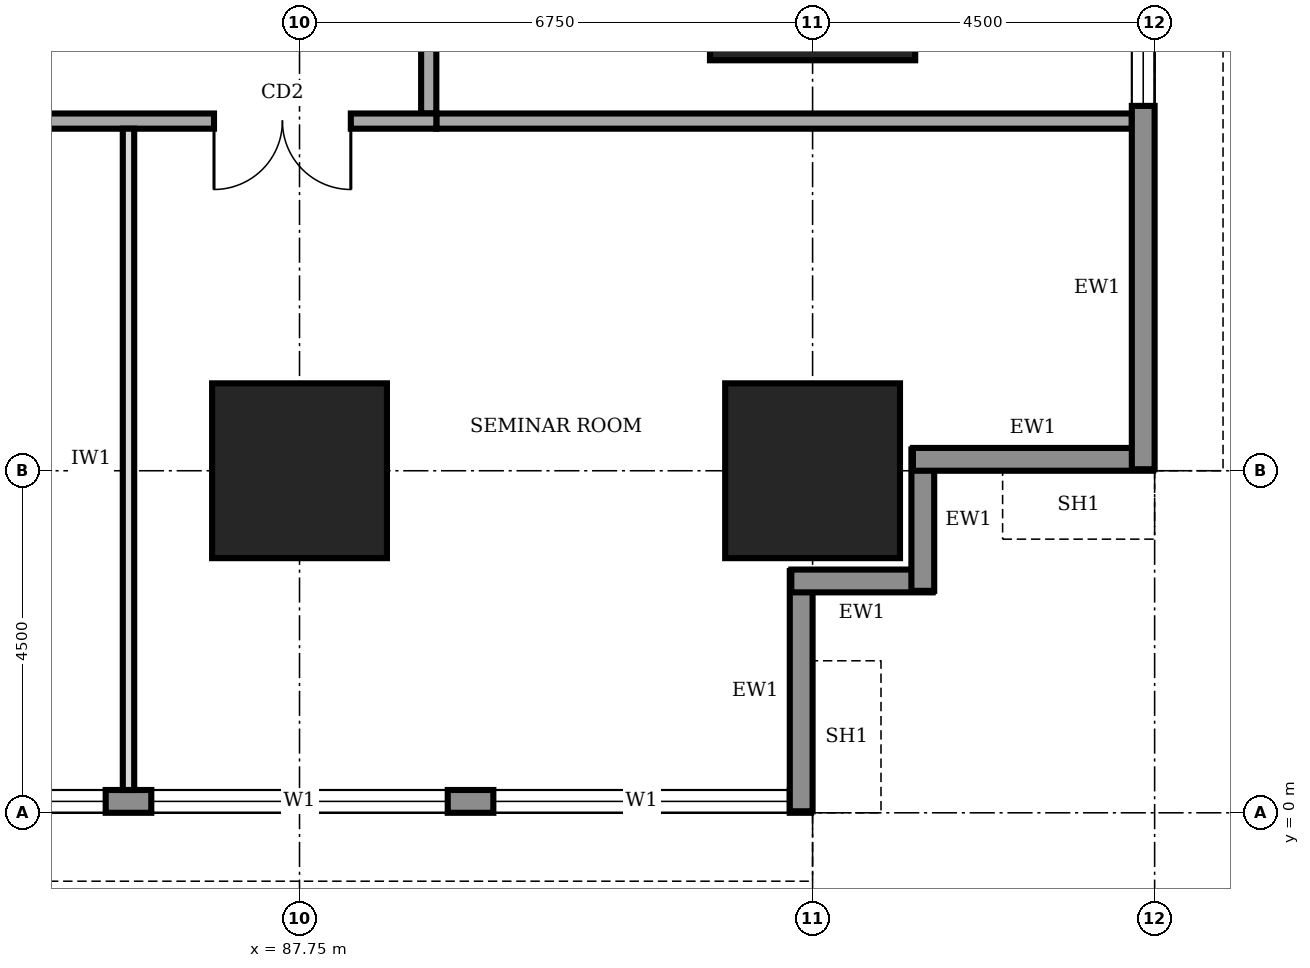
"""IFC4 building model, lengths in metres.
Left out: names, types, materials, properties, quantities, classifications, styles, units other than length and angle.
Written with IfcOpenShell. Run it as: python <this file> out.ifc"""

import sys

from ifc_helpers import new_model, si_unit, direction, frame, frame_2d, origin, origin_2d, place, context, subcontext, project, spatial, rectangle, extrude, element, fill, save


model = new_model("IFC4")
c1 = context("Model", 3, precision=1e-05, world=origin(), true_north=direction((0.0, 1.0)))
c2 = subcontext(c1, "Body", "Model", "MODEL_VIEW")
j1 = project(units=[si_unit("LENGTHUNIT", "METRE"), si_unit("PLANEANGLEUNIT", "RADIAN")], contexts=[c1])
p1 = place(None, origin())
s1 = spatial("IfcSite", under=j1, at=p1, CompositionType="ELEMENT")
p2 = place(p1, origin())
s2 = spatial("IfcBuilding", under=s1, at=p2, CompositionType="ELEMENT")
p3 = place(p2, frame((0.0, 0.0, 25.0)))
s3 = spatial("IfcBuildingStorey", under=s2, at=p3, CompositionType="ELEMENT", Elevation=25.0)
for number, where, z_axis, x_axis in (
    (1, (87.75, 4.5, 0.0), (0.0, 0.0, 1.0), (1.0, 0.0, 0.0)),
    (2, (94.5, 4.5, 0.0), (0.0, 0.0, 1.0), (1.0, 0.0, 0.0)),
):
    element("IfcColumn", number, at=place(p3, frame(where, z_axis=z_axis, x_axis=x_axis)), inside=s3, PredefinedType="COLUMN", context=c2, shape_type="SweptSolid", body=[
        extrude(rectangle(XDim=2.3, YDim=2.3, at=origin_2d()), origin(), (0.0, 0.0, 1.0), 4.0),
    ])
p4 = place(p3, frame((94.5, 11.25, 0.0), z_axis=(0.0, 0.0, 1.0), x_axis=(1.0, 0.0, 0.0)))
e3 = element("IfcColumn", 3, at=p4, inside=s3, PredefinedType="COLUMN", context=c2, shape_type="SweptSolid", body=[
    extrude(rectangle(XDim=2.7, YDim=2.7, at=origin_2d()), origin(), (0.0, 0.0, 1.0), 4.0),
])
p5 = place(p3, frame((67.52, 0.15, 0.0), z_axis=(0.0, 0.0, 1.0), x_axis=(1.0, 0.0, 0.0)))
e4 = element("IfcWall", 4, at=p5, inside=s3, PredefinedType="STANDARD", context=c2, shape_type="SweptSolid", body=[
    extrude(rectangle(XDim=26.96, YDim=0.3, at=frame_2d((13.48, 0.0))), origin(), (0.0, 0.0, 1.0), 3.75),
])
p6 = place(p5, frame((4.78, 0.0, 0.9)))
e5 = element("IfcOpeningElement", 5, at=p6, cuts=e4, PredefinedType="OPENING", context=c2, shape_type="SweptSolid", body=[
    extrude(rectangle(XDim=3.9, YDim=2.2, at=frame_2d((1.95, 1.1))), frame((0.0, 0.16, 0.0), z_axis=(0.0, -1.0, 0.0), x_axis=(1.0, 0.0, 0.0)), (0.0, 0.0, 1.0), 0.32),
])
p7 = place(p5, frame((9.28, 0.0, 0.9)))
e6 = element("IfcOpeningElement", 6, at=p7, cuts=e4, PredefinedType="OPENING", context=c2, shape_type="SweptSolid", body=[
    extrude(rectangle(XDim=3.9, YDim=2.2, at=frame_2d((1.95, 1.1))), frame((0.0, 0.16, 0.0), z_axis=(0.0, -1.0, 0.0), x_axis=(1.0, 0.0, 0.0)), (0.0, 0.0, 1.0), 0.32),
])
p8 = place(p5, frame((13.78, 0.0, 0.9)))
e7 = element("IfcOpeningElement", 7, at=p8, cuts=e4, PredefinedType="OPENING", context=c2, shape_type="SweptSolid", body=[
    extrude(rectangle(XDim=3.9, YDim=2.2, at=frame_2d((1.95, 1.1))), frame((0.0, 0.16, 0.0), z_axis=(0.0, -1.0, 0.0), x_axis=(1.0, 0.0, 0.0)), (0.0, 0.0, 1.0), 0.32),
])
p9 = place(p5, frame((18.28, 0.0, 0.9)))
e8 = element("IfcOpeningElement", 8, at=p9, cuts=e4, PredefinedType="OPENING", context=c2, shape_type="SweptSolid", body=[
    extrude(rectangle(XDim=3.9, YDim=2.2, at=frame_2d((1.95, 1.1))), frame((0.0, 0.16, 0.0), z_axis=(0.0, -1.0, 0.0), x_axis=(1.0, 0.0, 0.0)), (0.0, 0.0, 1.0), 0.32),
])
p10 = place(p5, frame((22.78, 0.0, 0.9)))
e9 = element("IfcOpeningElement", 9, at=p10, cuts=e4, PredefinedType="OPENING", context=c2, shape_type="SweptSolid", body=[
    extrude(rectangle(XDim=3.9, YDim=2.2, at=frame_2d((1.95, 1.1))), frame((0.0, 0.16, 0.0), z_axis=(0.0, -1.0, 0.0), x_axis=(1.0, 0.0, 0.0)), (0.0, 0.0, 1.0), 0.32),
])
p11 = place(p3, frame((94.35, 0.02, 0.0), z_axis=(0.0, 0.0, 1.0), x_axis=(0.0, 1.0, 0.0)))
e10 = element("IfcWall", 10, at=p11, inside=s3, PredefinedType="STANDARD", context=c2, shape_type="SweptSolid", body=[
    extrude(rectangle(XDim=3.16, YDim=0.3, at=frame_2d((1.58, 0.0))), origin(), (0.0, 0.0, 1.0), 2.85),
])
for number, where, z_axis, x_axis in (
    (11, (94.22, 3.05, 0.0), (0.0, 0.0, 1.0), (1.0, 0.0, 0.0)),
    (12, (95.95, 2.92, 0.0), (0.0, 0.0, 1.0), (0.0, 1.0, 0.0)),
):
    element("IfcWall", number, at=place(p3, frame(where, z_axis=z_axis, x_axis=x_axis)), inside=s3, PredefinedType="STANDARD", context=c2, shape_type="SweptSolid", body=[
        extrude(rectangle(XDim=1.86, YDim=0.3, at=frame_2d((0.93, 0.0))), origin(), (0.0, 0.0, 1.0), 3.75),
    ])
p12 = place(p3, frame((95.82, 4.65, 0.0), z_axis=(0.0, 0.0, 1.0), x_axis=(1.0, 0.0, 0.0)))
e13 = element("IfcWall", 13, at=p12, inside=s3, PredefinedType="STANDARD", context=c2, shape_type="SweptSolid", body=[
    extrude(rectangle(XDim=3.16, YDim=0.3, at=frame_2d((1.58, 0.0))), origin(), (0.0, 0.0, 1.0), 2.85),
])
p13 = place(p3, frame((98.85, 4.52, 0.0), z_axis=(0.0, 0.0, 1.0), x_axis=(0.0, 1.0, 0.0)))
e14 = element("IfcWall", 14, at=p13, inside=s3, PredefinedType="STANDARD", context=c2, shape_type="SweptSolid", body=[
    extrude(rectangle(XDim=31.46, YDim=0.3, at=frame_2d((15.73, 0.0))), origin(), (0.0, 0.0, 1.0), 3.75),
])
p14 = place(p13, frame((4.78, 0.0, 0.9)))
e15 = element("IfcOpeningElement", 15, at=p14, cuts=e14, PredefinedType="OPENING", context=c2, shape_type="SweptSolid", body=[
    extrude(rectangle(XDim=3.9, YDim=2.2, at=frame_2d((1.95, 1.1))), frame((0.0, 0.16, 0.0), z_axis=(0.0, -1.0, 0.0), x_axis=(1.0, 0.0, 0.0)), (0.0, 0.0, 1.0), 0.32),
])
p15 = place(p13, frame((9.28, 0.0, 0.9)))
e16 = element("IfcOpeningElement", 16, at=p15, cuts=e14, PredefinedType="OPENING", context=c2, shape_type="SweptSolid", body=[
    extrude(rectangle(XDim=3.9, YDim=2.2, at=frame_2d((1.95, 1.1))), frame((0.0, 0.16, 0.0), z_axis=(0.0, -1.0, 0.0), x_axis=(1.0, 0.0, 0.0)), (0.0, 0.0, 1.0), 0.32),
])
p16 = place(p13, frame((13.78, 0.0, 0.9)))
e17 = element("IfcOpeningElement", 17, at=p16, cuts=e14, PredefinedType="OPENING", context=c2, shape_type="SweptSolid", body=[
    extrude(rectangle(XDim=3.9, YDim=2.2, at=frame_2d((1.95, 1.1))), frame((0.0, 0.16, 0.0), z_axis=(0.0, -1.0, 0.0), x_axis=(1.0, 0.0, 0.0)), (0.0, 0.0, 1.0), 0.32),
])
p17 = place(p13, frame((18.28, 0.0, 0.9)))
e18 = element("IfcOpeningElement", 18, at=p17, cuts=e14, PredefinedType="OPENING", context=c2, shape_type="SweptSolid", body=[
    extrude(rectangle(XDim=3.9, YDim=2.2, at=frame_2d((1.95, 1.1))), frame((0.0, 0.16, 0.0), z_axis=(0.0, -1.0, 0.0), x_axis=(1.0, 0.0, 0.0)), (0.0, 0.0, 1.0), 0.32),
])
p18 = place(p13, frame((22.78, 0.0, 0.9)))
e19 = element("IfcOpeningElement", 19, at=p18, cuts=e14, PredefinedType="OPENING", context=c2, shape_type="SweptSolid", body=[
    extrude(rectangle(XDim=3.9, YDim=2.2, at=frame_2d((1.95, 1.1))), frame((0.0, 0.16, 0.0), z_axis=(0.0, -1.0, 0.0), x_axis=(1.0, 0.0, 0.0)), (0.0, 0.0, 1.0), 0.32),
])
p19 = place(p13, frame((27.28, 0.0, 0.9)))
e20 = element("IfcOpeningElement", 20, at=p19, cuts=e14, PredefinedType="OPENING", context=c2, shape_type="SweptSolid", body=[
    extrude(rectangle(XDim=3.9, YDim=2.2, at=frame_2d((1.95, 1.1))), frame((0.0, 0.16, 0.0), z_axis=(0.0, -1.0, 0.0), x_axis=(1.0, 0.0, 0.0)), (0.0, 0.0, 1.0), 0.32),
])
p20 = place(p3, frame((72.65, 9.1, 0.0), z_axis=(0.0, 0.0, 1.0), x_axis=(1.0, 0.0, 0.0)))
e21 = element("IfcWall", 21, at=p20, inside=s3, PredefinedType="SOLIDWALL", context=c2, shape_type="SweptSolid", body=[
    extrude(rectangle(XDim=16.9, YDim=0.2, at=frame_2d((8.45, 0.0))), origin(), (0.0, 0.0, 1.0), 3.75),
])
p21 = place(p20, frame((0.925, 0.0, 0.0)))
e22 = element("IfcOpeningElement", 22, at=p21, cuts=e21, PredefinedType="OPENING", context=c2, shape_type="SweptSolid", body=[
    extrude(rectangle(XDim=1.8, YDim=2.1, at=frame_2d((0.9, 1.05))), frame((0.0, 0.11, 0.0), z_axis=(0.0, -1.0, 0.0), x_axis=(1.0, 0.0, 0.0)), (0.0, 0.0, 1.0), 0.22),
])
p22 = place(p20, frame((7.85, 0.0, 0.0)))
e23 = element("IfcOpeningElement", 23, at=p22, cuts=e21, PredefinedType="OPENING", context=c2, shape_type="SweptSolid", body=[
    extrude(rectangle(XDim=1.0, YDim=2.1, at=frame_2d((0.5, 1.05))), frame((0.0, 0.11, 0.0), z_axis=(0.0, -1.0, 0.0), x_axis=(1.0, 0.0, 0.0)), (0.0, 0.0, 1.0), 0.22),
])
p23 = place(p20, frame((13.975, 0.0, 0.0)))
e24 = element("IfcOpeningElement", 24, at=p23, cuts=e21, PredefinedType="OPENING", context=c2, shape_type="SweptSolid", body=[
    extrude(rectangle(XDim=1.8, YDim=2.1, at=frame_2d((0.9, 1.05))), frame((0.0, 0.11, 0.0), z_axis=(0.0, -1.0, 0.0), x_axis=(1.0, 0.0, 0.0)), (0.0, 0.0, 1.0), 0.22),
])
p24 = place(p3, frame((89.45, 9.2, 0.0), z_axis=(0.0, 0.0, 1.0), x_axis=(0.0, 1.0, 0.0)))
e25 = element("IfcWall", 25, at=p24, inside=s3, PredefinedType="SOLIDWALL", context=c2, shape_type="SweptSolid", body=[
    extrude(rectangle(XDim=23.8, YDim=0.2, at=frame_2d((11.9, 0.0))), origin(), (0.0, 0.0, 1.0), 3.75),
])
p25 = place(p24, frame((1.55, 0.0, 0.0)))
e26 = element("IfcOpeningElement", 26, at=p25, cuts=e25, PredefinedType="OPENING", context=c2, shape_type="SweptSolid", body=[
    extrude(rectangle(XDim=1.0, YDim=2.1, at=frame_2d((0.5, 1.05))), frame((0.0, 0.11, 0.0), z_axis=(0.0, -1.0, 0.0), x_axis=(1.0, 0.0, 0.0)), (0.0, 0.0, 1.0), 0.22),
])
p26 = place(p24, frame((5.75, 0.0, 0.0)))
e27 = element("IfcOpeningElement", 27, at=p26, cuts=e25, PredefinedType="OPENING", context=c2, shape_type="SweptSolid", body=[
    extrude(rectangle(XDim=0.9, YDim=2.1, at=frame_2d((0.45, 1.05))), frame((0.0, 0.11, 0.0), z_axis=(0.0, -1.0, 0.0), x_axis=(1.0, 0.0, 0.0)), (0.0, 0.0, 1.0), 0.22),
])
p27 = place(p24, frame((8.75, 0.0, 0.0)))
e28 = element("IfcOpeningElement", 28, at=p27, cuts=e25, PredefinedType="OPENING", context=c2, shape_type="SweptSolid", body=[
    extrude(rectangle(XDim=0.9, YDim=2.1, at=frame_2d((0.45, 1.05))), frame((0.0, 0.11, 0.0), z_axis=(0.0, -1.0, 0.0), x_axis=(1.0, 0.0, 0.0)), (0.0, 0.0, 1.0), 0.22),
])
p28 = place(p24, frame((13.6, 0.0, 0.0)))
e29 = element("IfcOpeningElement", 29, at=p28, cuts=e25, PredefinedType="OPENING", context=c2, shape_type="SweptSolid", body=[
    extrude(rectangle(XDim=0.9, YDim=2.1, at=frame_2d((0.45, 1.05))), frame((0.0, 0.11, 0.0), z_axis=(0.0, -1.0, 0.0), x_axis=(1.0, 0.0, 0.0)), (0.0, 0.0, 1.0), 0.22),
])
p29 = place(p24, frame((16.3, 0.0, 0.0)))
e30 = element("IfcOpeningElement", 30, at=p29, cuts=e25, PredefinedType="OPENING", context=c2, shape_type="SweptSolid", body=[
    extrude(rectangle(XDim=1.0, YDim=2.1, at=frame_2d((0.5, 1.05))), frame((0.0, 0.11, 0.0), z_axis=(0.0, -1.0, 0.0), x_axis=(1.0, 0.0, 0.0)), (0.0, 0.0, 1.0), 0.22),
])
p30 = place(p24, frame((10.8, 0.0, 0.0)))
e31 = element("IfcOpeningElement", 31, at=p30, cuts=e25, PredefinedType="OPENING", context=c2, shape_type="SweptSolid", body=[
    extrude(rectangle(XDim=1.0, YDim=2.1, at=frame_2d((0.5, 1.05))), frame((0.0, 0.11, 0.0), z_axis=(0.0, -1.0, 0.0), x_axis=(1.0, 0.0, 0.0)), (0.0, 0.0, 1.0), 0.22),
])
p31 = place(p24, frame((20.3, 0.0, 0.0)))
e32 = element("IfcOpeningElement", 32, at=p31, cuts=e25, PredefinedType="OPENING", context=c2, shape_type="SweptSolid", body=[
    extrude(rectangle(XDim=1.0, YDim=2.1, at=frame_2d((0.5, 1.05))), frame((0.0, 0.11, 0.0), z_axis=(0.0, -1.0, 0.0), x_axis=(1.0, 0.0, 0.0)), (0.0, 0.0, 1.0), 0.22),
])
p32 = place(p3, frame((89.55, 9.1, 0.0), z_axis=(0.0, 0.0, 1.0), x_axis=(1.0, 0.0, 0.0)))
e33 = element("IfcWall", 33, at=p32, inside=s3, PredefinedType="SOLIDWALL", context=c2, shape_type="SweptSolid", body=[
    extrude(rectangle(XDim=9.15, YDim=0.2, at=frame_2d((4.575, 0.0))), origin(), (0.0, 0.0, 1.0), 3.75),
])
p33 = place(p3, frame((85.5, 0.3, 0.0), z_axis=(0.0, 0.0, 1.0), x_axis=(0.0, 1.0, 0.0)))
e34 = element("IfcWall", 34, at=p33, inside=s3, PredefinedType="PARTITIONING", context=c2, shape_type="SweptSolid", body=[
    extrude(rectangle(XDim=8.7, YDim=0.15, at=frame_2d((4.35, 0.0))), origin(), (0.0, 0.0, 1.0), 3.75),
])
p34 = place(p8, origin())
e35 = element("IfcWindow", 35, at=p34, inside=s3, PartitioningType="SINGLE_PANEL", PredefinedType="WINDOW", context=c2, shape_type="SweptSolid", body=[
    extrude(rectangle(XDim=3.9, YDim=2.2, at=frame_2d((1.95, 1.1))), frame((0.0, 0.03, 0.0), z_axis=(0.0, -1.0, 0.0), x_axis=(1.0, 0.0, 0.0)), (0.0, 0.0, 1.0), 0.06),
])
fill(e7, e35)
p35 = place(p9, origin())
e36 = element("IfcWindow", 36, at=p35, inside=s3, PartitioningType="SINGLE_PANEL", PredefinedType="WINDOW", context=c2, shape_type="SweptSolid", body=[
    extrude(rectangle(XDim=3.9, YDim=2.2, at=frame_2d((1.95, 1.1))), frame((0.0, 0.03, 0.0), z_axis=(0.0, -1.0, 0.0), x_axis=(1.0, 0.0, 0.0)), (0.0, 0.0, 1.0), 0.06),
])
fill(e8, e36)
p36 = place(p10, origin())
e37 = element("IfcWindow", 37, at=p36, inside=s3, PartitioningType="SINGLE_PANEL", PredefinedType="WINDOW", context=c2, shape_type="SweptSolid", body=[
    extrude(rectangle(XDim=3.9, YDim=2.2, at=frame_2d((1.95, 1.1))), frame((0.0, 0.03, 0.0), z_axis=(0.0, -1.0, 0.0), x_axis=(1.0, 0.0, 0.0)), (0.0, 0.0, 1.0), 0.06),
])
fill(e9, e37)
p37 = place(p14, origin())
e38 = element("IfcWindow", 38, at=p37, inside=s3, PartitioningType="SINGLE_PANEL", PredefinedType="WINDOW", context=c2, shape_type="SweptSolid", body=[
    extrude(rectangle(XDim=3.9, YDim=2.2, at=frame_2d((1.95, 1.1))), frame((0.0, 0.03, 0.0), z_axis=(0.0, -1.0, 0.0), x_axis=(1.0, 0.0, 0.0)), (0.0, 0.0, 1.0), 0.06),
])
fill(e15, e38)
p38 = place(p23, frame((1.8, 0.0, 0.0), z_axis=(0.0, 0.0, 1.0), x_axis=(-1.0, 0.0, 0.0)))
e39 = element("IfcDoor", 39, at=p38, inside=s3, OperationType="DOUBLE_DOOR_SINGLE_SWING", PredefinedType="DOOR", context=c2, shape_type="SweptSolid", body=[
    extrude(rectangle(XDim=1.8, YDim=2.1, at=frame_2d((0.9, 1.05))), frame((0.0, 0.025, 0.0), z_axis=(0.0, -1.0, 0.0), x_axis=(1.0, 0.0, 0.0)), (0.0, 0.0, 1.0), 0.05),
])
fill(e24, e39)
save(model, sys.argv[1])
